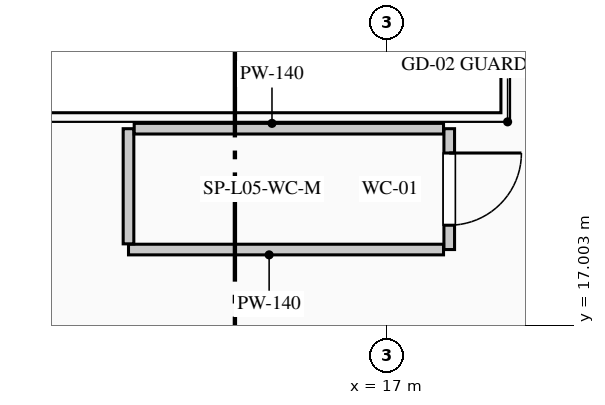
"""IFC4 building model, lengths in metres.
Left out: names, types, materials, properties, quantities, classifications, styles, units other than length and angle.
Written with IfcOpenShell. Run it as: python <this file> out.ifc"""

import sys

from ifc_helpers import new_model, si_unit, direction, frame, frame_2d, origin, place, context, subcontext, project, spatial, rectangle, extrude, element, fill, save


model = new_model("IFC4")
c1 = context("Model", 3, precision=1e-05, world=origin(), true_north=direction((0.0, 1.0)))
c2 = subcontext(c1, "Body", "Model", "MODEL_VIEW")
j1 = project(units=[si_unit("LENGTHUNIT", "METRE"), si_unit("PLANEANGLEUNIT", "RADIAN")], contexts=[c1])
p1 = place(None, origin())
s1 = spatial("IfcSite", under=j1, at=p1, CompositionType="ELEMENT")
p2 = place(p1, origin())
s2 = spatial("IfcBuilding", under=s1, at=p2, CompositionType="ELEMENT")
p3 = place(p2, frame((0.0, 0.0, 21.6)))
s3 = spatial("IfcBuildingStorey", under=s2, at=p3, CompositionType="ELEMENT", Elevation=21.6)
p4 = place(p3, frame((17.82, 19.59, 0.0), z_axis=(0.0, 0.0, 1.0), x_axis=(0.0, -1.0, 0.0)))
e1 = element("IfcWall", 1, at=p4, inside=s3, PredefinedType="PARTITIONING", context=c2, shape_type="SweptSolid", body=[
    extrude(rectangle(XDim=1.59, YDim=0.14, at=frame_2d((0.795, 0.0))), origin(), (0.0, 0.0, 1.0), 5.0),
])
p5 = place(p4, frame((0.32, 0.0, 0.0)))
e2 = element("IfcOpeningElement", 2, at=p5, cuts=e1, PredefinedType="OPENING", context=c2, shape_type="SweptSolid", body=[
    extrude(rectangle(XDim=0.95, YDim=2.15, at=frame_2d((0.475, 1.075))), frame((0.0, 0.08, 0.0), z_axis=(0.0, -1.0, 0.0), x_axis=(1.0, 0.0, 0.0)), (0.0, 0.0, 1.0), 0.16),
])
p6 = place(p3, frame((17.745, 18.0, 0.0), z_axis=(0.0, 0.0, 1.0), x_axis=(-1.0, 0.0, 0.0)))
e3 = element("IfcWall", 3, at=p6, inside=s3, PredefinedType="PARTITIONING", context=c2, shape_type="SweptSolid", body=[
    extrude(rectangle(XDim=4.145, YDim=0.14, at=frame_2d((2.073, 0.0))), origin(), (0.0, 0.0, 1.0), 5.0),
])
p7 = place(p3, frame((13.6, 18.075, 0.0), z_axis=(0.0, 0.0, 1.0), x_axis=(0.0, 1.0, 0.0)))
e4 = element("IfcWall", 4, at=p7, inside=s3, PredefinedType="PARTITIONING", context=c2, shape_type="SweptSolid", body=[
    extrude(rectangle(XDim=1.515, YDim=0.14, at=frame_2d((0.758, 0.0))), origin(), (0.0, 0.0, 1.0), 5.0),
])
p8 = place(p3, frame((13.675, 19.59, 0.0), z_axis=(0.0, 0.0, 1.0), x_axis=(1.0, 0.0, 0.0)))
e5 = element("IfcWall", 5, at=p8, inside=s3, PredefinedType="PARTITIONING", context=c2, shape_type="SweptSolid", body=[
    extrude(rectangle(XDim=4.07, YDim=0.14, at=frame_2d((2.035, 0.0))), origin(), (0.0, 0.0, 1.0), 5.0),
])
p9 = place(p5, origin())
e6 = element("IfcDoor", 6, at=p9, inside=s3, OperationType="SINGLE_SWING_LEFT", PredefinedType="DOOR", context=c2, shape_type="SweptSolid", body=[
    extrude(rectangle(XDim=0.95, YDim=2.15, at=frame_2d((0.475, 1.075))), frame((0.0, 0.025, 0.0), z_axis=(0.0, -1.0, 0.0), x_axis=(1.0, 0.0, 0.0)), (0.0, 0.0, 1.0), 0.05),
])
fill(e2, e6)
save(model, sys.argv[1])
